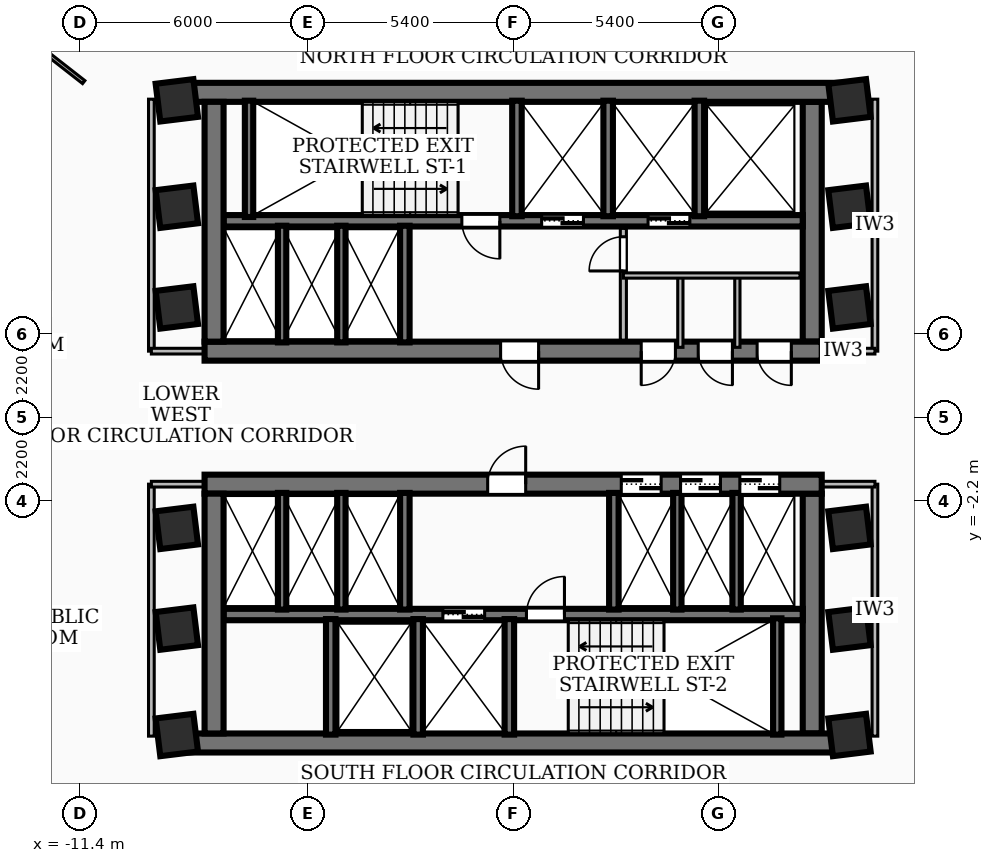
"""IFC4 building model, lengths in metres.
Left out: names, types, materials, properties, quantities, classifications, styles, units other than length and angle.
Written with IfcOpenShell. Run it as: python <this file> out.ifc"""

import sys

from ifc_helpers import new_model, si_unit, direction, frame, frame_2d, origin, origin_2d, place, context, subcontext, project, spatial, rectangle, extrude, element, fill, save


model = new_model("IFC4")
c1 = context("Model", 3, precision=1e-05, world=origin(), true_north=direction((0.0, 1.0)))
c2 = subcontext(c1, "Body", "Model", "MODEL_VIEW")
j1 = project(units=[si_unit("LENGTHUNIT", "METRE"), si_unit("PLANEANGLEUNIT", "RADIAN")], contexts=[c1])
p1 = place(None, origin())
s1 = spatial("IfcSite", under=j1, at=p1, CompositionType="ELEMENT")
p2 = place(p1, origin())
s2 = spatial("IfcBuilding", under=s1, at=p2, CompositionType="ELEMENT")
p3 = place(p2, frame((0.0, 0.0, 78.48)))
s3 = spatial("IfcBuildingStorey", under=s2, at=p3, CompositionType="ELEMENT", Elevation=78.48)
p4 = place(p3, frame((-8.78, 8.56, 0.0), z_axis=(0.0, 0.0, 1.0), x_axis=(1.0, 0.0, 0.0)))
e1 = element("IfcWall", 1, at=p4, inside=s3, PredefinedType="SHEAR", context=c2, shape_type="SweptSolid", body=[
    extrude(rectangle(XDim=17.56, YDim=0.5, at=frame_2d((8.78, 0.0))), origin(), (0.0, 0.0, 1.0), 3.34),
])
p5 = place(p3, frame((8.12, 1.75, 0.0), z_axis=(0.0, 0.0, 1.0), x_axis=(-1.0, 0.0, 0.0)))
e2 = element("IfcWall", 2, at=p5, inside=s3, PredefinedType="SHEAR", context=c2, shape_type="SweptSolid", body=[
    extrude(rectangle(XDim=16.24, YDim=0.5, at=frame_2d((8.12, 0.0))), origin(), (0.0, 0.0, 1.0), 3.34),
])
p6 = place(p5, frame((7.45, 0.0, 0.0)))
e3 = element("IfcOpeningElement", 3, at=p6, cuts=e2, PredefinedType="OPENING", context=c2, shape_type="SweptSolid", body=[
    extrude(rectangle(XDim=1.0, YDim=2.1, at=frame_2d((0.5, 1.05))), frame((0.0, 0.26, 0.0), z_axis=(0.0, -1.0, 0.0), x_axis=(1.0, 0.0, 0.0)), (0.0, 0.0, 1.0), 0.52),
])
p7 = place(p5, frame((3.85, 0.0, 0.0)))
e4 = element("IfcOpeningElement", 4, at=p7, cuts=e2, PredefinedType="OPENING", context=c2, shape_type="SweptSolid", body=[
    extrude(rectangle(XDim=0.9, YDim=2.06, at=frame_2d((0.45, 1.03))), frame((0.0, 0.26, 0.0), z_axis=(0.0, -1.0, 0.0), x_axis=(1.0, 0.0, 0.0)), (0.0, 0.0, 1.0), 0.52),
])
p8 = place(p5, frame((2.35, 0.0, 0.0)))
e5 = element("IfcOpeningElement", 5, at=p8, cuts=e2, PredefinedType="OPENING", context=c2, shape_type="SweptSolid", body=[
    extrude(rectangle(XDim=0.9, YDim=2.06, at=frame_2d((0.45, 1.03))), frame((0.0, 0.26, 0.0), z_axis=(0.0, -1.0, 0.0), x_axis=(1.0, 0.0, 0.0)), (0.0, 0.0, 1.0), 0.52),
])
p9 = place(p5, frame((0.8, 0.0, 0.0)))
e6 = element("IfcOpeningElement", 6, at=p9, cuts=e2, PredefinedType="OPENING", context=c2, shape_type="SweptSolid", body=[
    extrude(rectangle(XDim=0.9, YDim=2.06, at=frame_2d((0.45, 1.03))), frame((0.0, 0.26, 0.0), z_axis=(0.0, -1.0, 0.0), x_axis=(1.0, 0.0, 0.0)), (0.0, 0.0, 1.0), 0.52),
])
for number, where, z_axis, x_axis in (
    (7, (-7.87, 2.0, 0.0), (0.0, 0.0, 1.0), (0.0, 1.0, 0.0)),
    (8, (7.87, 8.31, 0.0), (0.0, 0.0, 1.0), (0.0, -1.0, 0.0)),
):
    element("IfcWall", number, at=place(p3, frame(where, z_axis=z_axis, x_axis=x_axis)), inside=s3, PredefinedType="SHEAR", context=c2, shape_type="SweptSolid", body=[
        extrude(rectangle(XDim=6.31, YDim=0.5, at=frame_2d((3.155, 0.0))), origin(), (0.0, 0.0, 1.0), 3.34),
    ])
p10 = place(p3, frame((7.62, 5.18, 0.0), z_axis=(0.0, 0.0, 1.0), x_axis=(-1.0, 0.0, 0.0)))
e9 = element("IfcWall", 9, at=p10, inside=s3, PredefinedType="SOLIDWALL", context=c2, shape_type="SweptSolid", body=[
    extrude(rectangle(XDim=15.24, YDim=0.3, at=frame_2d((7.62, 0.0))), origin(), (0.0, 0.0, 1.0), 3.34),
])
p11 = place(p10, frame((5.77, 0.0, 0.0)))
e10 = element("IfcOpeningElement", 10, at=p11, cuts=e9, PredefinedType="OPENING", context=c2, shape_type="SweptSolid", body=[
    extrude(rectangle(XDim=1.1, YDim=2.15, at=frame_2d((0.55, 1.075))), frame((0.0, 0.16, 0.0), z_axis=(0.0, -1.0, 0.0), x_axis=(1.0, 0.0, 0.0)), (0.0, 0.0, 1.0), 0.32),
])
p12 = place(p10, frame((2.97, 0.0, 0.0)))
e11 = element("IfcOpeningElement", 11, at=p12, cuts=e9, PredefinedType="OPENING", context=c2, shape_type="SweptSolid", body=[
    extrude(rectangle(XDim=1.1, YDim=2.15, at=frame_2d((0.55, 1.075))), frame((0.0, 0.16, 0.0), z_axis=(0.0, -1.0, 0.0), x_axis=(1.0, 0.0, 0.0)), (0.0, 0.0, 1.0), 0.32),
])
p13 = place(p10, frame((7.97, 0.0, 0.0)))
e12 = element("IfcOpeningElement", 12, at=p13, cuts=e9, PredefinedType="OPENING", context=c2, shape_type="SweptSolid", body=[
    extrude(rectangle(XDim=1.0, YDim=2.1, at=frame_2d((0.5, 1.05))), frame((0.0, 0.16, 0.0), z_axis=(0.0, -1.0, 0.0), x_axis=(1.0, 0.0, 0.0)), (0.0, 0.0, 1.0), 0.32),
])
p14 = place(p3, frame((8.78, -8.56, 0.0), z_axis=(0.0, 0.0, 1.0), x_axis=(-1.0, 0.0, 0.0)))
e13 = element("IfcWall", 13, at=p14, inside=s3, PredefinedType="SHEAR", context=c2, shape_type="SweptSolid", body=[
    extrude(rectangle(XDim=17.56, YDim=0.5, at=frame_2d((8.78, 0.0))), origin(), (0.0, 0.0, 1.0), 3.34),
])
p15 = place(p3, frame((-8.12, -1.75, 0.0), z_axis=(0.0, 0.0, 1.0), x_axis=(1.0, 0.0, 0.0)))
e14 = element("IfcWall", 14, at=p15, inside=s3, PredefinedType="SHEAR", context=c2, shape_type="SweptSolid", body=[
    extrude(rectangle(XDim=16.24, YDim=0.5, at=frame_2d((8.12, 0.0))), origin(), (0.0, 0.0, 1.0), 3.34),
])
p16 = place(p15, frame((7.45, 0.0, 0.0)))
e15 = element("IfcOpeningElement", 15, at=p16, cuts=e14, PredefinedType="OPENING", context=c2, shape_type="SweptSolid", body=[
    extrude(rectangle(XDim=1.0, YDim=2.1, at=frame_2d((0.5, 1.05))), frame((0.0, 0.26, 0.0), z_axis=(0.0, -1.0, 0.0), x_axis=(1.0, 0.0, 0.0)), (0.0, 0.0, 1.0), 0.52),
])
p17 = place(p15, frame((10.965, 0.0, 0.0)))
e16 = element("IfcOpeningElement", 16, at=p17, cuts=e14, PredefinedType="OPENING", context=c2, shape_type="SweptSolid", body=[
    extrude(rectangle(XDim=1.05, YDim=2.15, at=frame_2d((0.525, 1.075))), frame((0.0, 0.26, 0.0), z_axis=(0.0, -1.0, 0.0), x_axis=(1.0, 0.0, 0.0)), (0.0, 0.0, 1.0), 0.52),
])
p18 = place(p15, frame((12.525, 0.0, 0.0)))
e17 = element("IfcOpeningElement", 17, at=p18, cuts=e14, PredefinedType="OPENING", context=c2, shape_type="SweptSolid", body=[
    extrude(rectangle(XDim=1.05, YDim=2.15, at=frame_2d((0.525, 1.075))), frame((0.0, 0.26, 0.0), z_axis=(0.0, -1.0, 0.0), x_axis=(1.0, 0.0, 0.0)), (0.0, 0.0, 1.0), 0.52),
])
p19 = place(p15, frame((14.085, 0.0, 0.0)))
e18 = element("IfcOpeningElement", 18, at=p19, cuts=e14, PredefinedType="OPENING", context=c2, shape_type="SweptSolid", body=[
    extrude(rectangle(XDim=1.05, YDim=2.15, at=frame_2d((0.525, 1.075))), frame((0.0, 0.26, 0.0), z_axis=(0.0, -1.0, 0.0), x_axis=(1.0, 0.0, 0.0)), (0.0, 0.0, 1.0), 0.52),
])
for number, where, z_axis, x_axis in (
    (19, (-7.87, -8.31, 0.0), (0.0, 0.0, 1.0), (0.0, 1.0, 0.0)),
    (20, (7.87, -2.0, 0.0), (0.0, 0.0, 1.0), (0.0, -1.0, 0.0)),
):
    element("IfcWall", number, at=place(p3, frame(where, z_axis=z_axis, x_axis=x_axis)), inside=s3, PredefinedType="SHEAR", context=c2, shape_type="SweptSolid", body=[
        extrude(rectangle(XDim=6.31, YDim=0.5, at=frame_2d((3.155, 0.0))), origin(), (0.0, 0.0, 1.0), 3.34),
    ])
p20 = place(p3, frame((-7.62, -5.18, 0.0), z_axis=(0.0, 0.0, 1.0), x_axis=(1.0, 0.0, 0.0)))
e21 = element("IfcWall", 21, at=p20, inside=s3, PredefinedType="SOLIDWALL", context=c2, shape_type="SweptSolid", body=[
    extrude(rectangle(XDim=15.24, YDim=0.3, at=frame_2d((7.62, 0.0))), origin(), (0.0, 0.0, 1.0), 3.34),
])
p21 = place(p20, frame((5.77, 0.0, 0.0)))
e22 = element("IfcOpeningElement", 22, at=p21, cuts=e21, PredefinedType="OPENING", context=c2, shape_type="SweptSolid", body=[
    extrude(rectangle(XDim=1.1, YDim=2.15, at=frame_2d((0.55, 1.075))), frame((0.0, 0.16, 0.0), z_axis=(0.0, -1.0, 0.0), x_axis=(1.0, 0.0, 0.0)), (0.0, 0.0, 1.0), 0.32),
])
p22 = place(p20, frame((7.97, 0.0, 0.0)))
e23 = element("IfcOpeningElement", 23, at=p22, cuts=e21, PredefinedType="OPENING", context=c2, shape_type="SweptSolid", body=[
    extrude(rectangle(XDim=1.0, YDim=2.1, at=frame_2d((0.5, 1.05))), frame((0.0, 0.16, 0.0), z_axis=(0.0, -1.0, 0.0), x_axis=(1.0, 0.0, 0.0)), (0.0, 0.0, 1.0), 0.32),
])
for number, where, z_axis, x_axis in (
    (24, (-6.95, 5.28, 0.0), (0.0, 0.0, 1.0), (0.0, 1.0, 0.0)),
    (25, (6.95, -8.34, 0.0), (0.0, 0.0, 1.0), (0.0, 1.0, 0.0)),
):
    element("IfcWall", number, at=place(p3, frame(where, z_axis=z_axis, x_axis=x_axis)), inside=s3, PredefinedType="SOLIDWALL", context=c2, shape_type="SweptSolid", body=[
        extrude(rectangle(XDim=3.06, YDim=0.22, at=frame_2d((1.53, 0.0))), origin(), (0.0, 0.0, 1.0), 3.34),
    ])
for number, where, z_axis, x_axis in (
    (26, (0.1, 5.3, 0.0), (0.0, 0.0, 1.0), (0.0, 1.0, 0.0)),
    (27, (2.5, 5.3, 0.0), (0.0, 0.0, 1.0), (0.0, 1.0, 0.0)),
    (28, (4.9, 5.3, 0.0), (0.0, 0.0, 1.0), (0.0, 1.0, 0.0)),
):
    element("IfcWall", number, at=place(p3, frame(where, z_axis=z_axis, x_axis=x_axis)), inside=s3, PredefinedType="SOLIDWALL", context=c2, shape_type="SweptSolid", body=[
        extrude(rectangle(XDim=3.04, YDim=0.25, at=frame_2d((1.52, 0.0))), origin(), (0.0, 0.0, 1.0), 3.34),
    ])
p23 = place(p3, frame((-2.85, 1.98, 0.0), z_axis=(0.0, 0.0, 1.0), x_axis=(0.0, 1.0, 0.0)))
e29 = element("IfcWall", 29, at=p23, inside=s3, PredefinedType="SOLIDWALL", context=c2, shape_type="SweptSolid", body=[
    extrude(rectangle(XDim=3.07, YDim=0.25, at=frame_2d((1.535, 0.0))), origin(), (0.0, 0.0, 1.0), 3.34),
])
for number, where, z_axis, x_axis in (
    (30, (-0.1, -8.34, 0.0), (0.0, 0.0, 1.0), (0.0, 1.0, 0.0)),
    (31, (-2.5, -8.34, 0.0), (0.0, 0.0, 1.0), (0.0, 1.0, 0.0)),
    (32, (-4.8, -8.34, 0.0), (0.0, 0.0, 1.0), (0.0, 1.0, 0.0)),
):
    element("IfcWall", number, at=place(p3, frame(where, z_axis=z_axis, x_axis=x_axis)), inside=s3, PredefinedType="SOLIDWALL", context=c2, shape_type="SweptSolid", body=[
        extrude(rectangle(XDim=3.04, YDim=0.25, at=frame_2d((1.52, 0.0))), origin(), (0.0, 0.0, 1.0), 3.34),
    ])
for number, where, z_axis, x_axis in (
    (33, (-2.85, -5.05, 0.0), (0.0, 0.0, 1.0), (0.0, 1.0, 0.0)),
    (34, (2.65, -5.05, 0.0), (0.0, 0.0, 1.0), (0.0, 1.0, 0.0)),
):
    element("IfcWall", number, at=place(p3, frame(where, z_axis=z_axis, x_axis=x_axis)), inside=s3, PredefinedType="SOLIDWALL", context=c2, shape_type="SweptSolid", body=[
        extrude(rectangle(XDim=3.07, YDim=0.25, at=frame_2d((1.535, 0.0))), origin(), (0.0, 0.0, 1.0), 3.34),
    ])
for number, where, z_axis, x_axis in (
    (35, (-6.08, 1.98, 0.0), (0.0, 0.0, 1.0), (0.0, 1.0, 0.0)),
    (36, (-4.52, 1.98, 0.0), (0.0, 0.0, 1.0), (0.0, 1.0, 0.0)),
    (37, (4.32, -5.05, 0.0), (0.0, 0.0, 1.0), (0.0, 1.0, 0.0)),
    (38, (5.88, -5.05, 0.0), (0.0, 0.0, 1.0), (0.0, 1.0, 0.0)),
    (39, (-6.08, -5.05, 0.0), (0.0, 0.0, 1.0), (0.0, 1.0, 0.0)),
    (40, (-4.52, -5.05, 0.0), (0.0, 0.0, 1.0), (0.0, 1.0, 0.0)),
):
    element("IfcWall", number, at=place(p3, frame(where, z_axis=z_axis, x_axis=x_axis)), inside=s3, PredefinedType="SOLIDWALL", context=c2, shape_type="SweptSolid", body=[
        extrude(rectangle(XDim=3.07, YDim=0.22, at=frame_2d((1.535, 0.0))), origin(), (0.0, 0.0, 1.0), 3.34),
    ])
for number, where, z_axis, x_axis in (
    (41, (-8.85, -5.55, 0.0), (0.0, 0.0, 1.0), (0.993, 0.122, 0.0)),
    (42, (-8.85, -2.9, 0.0), (0.0, 0.0, 1.0), (0.993, 0.122, 0.0)),
    (43, (-8.85, 2.9, 0.0), (0.0, 0.0, 1.0), (0.993, 0.122, 0.0)),
    (44, (-8.85, 5.55, 0.0), (0.0, 0.0, 1.0), (0.993, 0.122, 0.0)),
    (45, (8.85, -5.55, 0.0), (0.0, 0.0, 1.0), (0.993, 0.122, 0.0)),
    (46, (8.85, -2.9, 0.0), (0.0, 0.0, 1.0), (0.993, 0.122, 0.0)),
    (47, (8.85, 2.9, 0.0), (0.0, 0.0, 1.0), (0.993, 0.122, 0.0)),
    (48, (8.85, 5.55, 0.0), (0.0, 0.0, 1.0), (0.993, 0.122, 0.0)),
    (49, (-8.85, 8.35, 0.0), (0.0, 0.0, 1.0), (0.993, 0.122, 0.0)),
    (50, (8.85, -8.35, 0.0), (0.0, 0.0, 1.0), (0.993, 0.122, 0.0)),
    (51, (8.85, 8.35, 0.0), (0.0, 0.0, 1.0), (0.993, 0.122, 0.0)),
    (52, (-8.85, -8.35, 0.0), (0.0, 0.0, 1.0), (0.993, 0.122, 0.0)),
):
    element("IfcColumn", number, at=place(p3, frame(where, z_axis=z_axis, x_axis=x_axis)), inside=s3, PredefinedType="COLUMN", context=c2, shape_type="SweptSolid", body=[
        extrude(rectangle(XDim=1.0, YDim=1.0, at=origin_2d()), origin(), (0.0, 0.0, 1.0), 3.6),
    ])
p24 = place(p3, frame((2.9, 2.04, 0.0), z_axis=(0.0, 0.0, 1.0), x_axis=(0.0, 1.0, 0.0)))
e53 = element("IfcWall", 53, at=p24, inside=s3, PredefinedType="PARTITIONING", context=c2, shape_type="SweptSolid", body=[
    extrude(rectangle(XDim=2.94, YDim=0.16, at=frame_2d((1.47, 0.0))), origin(), (0.0, 0.0, 1.0), 2.405),
])
p25 = place(p24, frame((1.82, 0.0, 0.0)))
e54 = element("IfcOpeningElement", 54, at=p25, cuts=e53, PredefinedType="OPENING", context=c2, shape_type="SweptSolid", body=[
    extrude(rectangle(XDim=0.9, YDim=2.06, at=frame_2d((0.45, 1.03))), frame((0.0, 0.09, 0.0), z_axis=(0.0, -1.0, 0.0), x_axis=(1.0, 0.0, 0.0)), (0.0, 0.0, 1.0), 0.18),
])
p26 = place(p3, frame((2.9, 3.74, 0.0), z_axis=(0.0, 0.0, 1.0), x_axis=(1.0, 0.0, 0.0)))
e55 = element("IfcWall", 55, at=p26, inside=s3, PredefinedType="PARTITIONING", context=c2, shape_type="SweptSolid", body=[
    extrude(rectangle(XDim=4.65, YDim=0.138, at=frame_2d((2.325, 0.0))), origin(), (0.0, 0.0, 1.0), 3.34),
])
for number, where, z_axis, x_axis in (
    (56, (4.4, 1.85, 0.0), (0.0, 0.0, 1.0), (0.0, 1.0, 0.0)),
    (57, (5.9, 1.85, 0.0), (0.0, 0.0, 1.0), (0.0, 1.0, 0.0)),
):
    element("IfcWall", number, at=place(p3, frame(where, z_axis=z_axis, x_axis=x_axis)), inside=s3, PredefinedType="PARTITIONING", context=c2, shape_type="SweptSolid", body=[
        extrude(rectangle(XDim=1.89, YDim=0.138, at=frame_2d((0.945, 0.0))), origin(), (0.0, 0.0, 1.0), 2.405),
    ])
p27 = place(p3, frame((-9.52, 1.75, 0.0), z_axis=(0.0, 0.0, 1.0), x_axis=(0.0, 1.0, 0.0)))
e58 = element("IfcWall", 58, at=p27, inside=s3, PredefinedType="PARTITIONING", context=c2, shape_type="SweptSolid", body=[
    extrude(rectangle(XDim=6.63, YDim=0.15, at=frame_2d((3.315, 0.0))), origin(), (0.0, 0.0, 1.0), 2.486),
])
p28 = place(p3, frame((-7.85, 1.75, 0.0), z_axis=(0.0, 0.0, 1.0), x_axis=(-1.0, 0.0, 0.0)))
e59 = element("IfcWall", 59, at=p28, inside=s3, PredefinedType="PARTITIONING", context=c2, shape_type="SweptSolid", body=[
    extrude(rectangle(XDim=1.67, YDim=0.15, at=frame_2d((0.835, 0.0))), origin(), (0.0, 0.0, 1.0), 2.405),
])
p29 = place(p3, frame((-9.52, -8.38, 0.0), z_axis=(0.0, 0.0, 1.0), x_axis=(0.0, 1.0, 0.0)))
e60 = element("IfcWall", 60, at=p29, inside=s3, PredefinedType="PARTITIONING", context=c2, shape_type="SweptSolid", body=[
    extrude(rectangle(XDim=6.63, YDim=0.15, at=frame_2d((3.315, 0.0))), origin(), (0.0, 0.0, 1.0), 2.486),
])
p30 = place(p3, frame((-7.85, -1.75, 0.0), z_axis=(0.0, 0.0, 1.0), x_axis=(-1.0, 0.0, 0.0)))
e61 = element("IfcWall", 61, at=p30, inside=s3, PredefinedType="PARTITIONING", context=c2, shape_type="SweptSolid", body=[
    extrude(rectangle(XDim=1.67, YDim=0.15, at=frame_2d((0.835, 0.0))), origin(), (0.0, 0.0, 1.0), 2.405),
])
p31 = place(p3, frame((9.52, 1.75, 0.0), z_axis=(0.0, 0.0, 1.0), x_axis=(0.0, 1.0, 0.0)))
e62 = element("IfcWall", 62, at=p31, inside=s3, PredefinedType="PARTITIONING", context=c2, shape_type="SweptSolid", body=[
    extrude(rectangle(XDim=6.63, YDim=0.15, at=frame_2d((3.315, 0.0))), origin(), (0.0, 0.0, 1.0), 2.486),
])
p32 = place(p3, frame((7.85, 1.75, 0.0), z_axis=(0.0, 0.0, 1.0), x_axis=(1.0, 0.0, 0.0)))
e63 = element("IfcWall", 63, at=p32, inside=s3, PredefinedType="PARTITIONING", context=c2, shape_type="SweptSolid", body=[
    extrude(rectangle(XDim=1.67, YDim=0.15, at=frame_2d((0.835, 0.0))), origin(), (0.0, 0.0, 1.0), 2.405),
])
p33 = place(p3, frame((9.52, -8.38, 0.0), z_axis=(0.0, 0.0, 1.0), x_axis=(0.0, 1.0, 0.0)))
e64 = element("IfcWall", 64, at=p33, inside=s3, PredefinedType="PARTITIONING", context=c2, shape_type="SweptSolid", body=[
    extrude(rectangle(XDim=6.63, YDim=0.15, at=frame_2d((3.315, 0.0))), origin(), (0.0, 0.0, 1.0), 2.486),
])
p34 = place(p3, frame((7.85, -1.75, 0.0), z_axis=(0.0, 0.0, 1.0), x_axis=(1.0, 0.0, 0.0)))
e65 = element("IfcWall", 65, at=p34, inside=s3, PredefinedType="PARTITIONING", context=c2, shape_type="SweptSolid", body=[
    extrude(rectangle(XDim=1.67, YDim=0.15, at=frame_2d((0.835, 0.0))), origin(), (0.0, 0.0, 1.0), 2.405),
])
p35 = place(p3, frame((-11.3, 8.829, 0.0), z_axis=(0.0, 0.0, 1.0), x_axis=(-0.788014623364, 0.61565652223, 0.0)))
e66 = element("IfcWall", 66, at=p35, inside=s3, PredefinedType="PARTITIONING", context=c2, shape_type="SweptSolid", body=[
    extrude(rectangle(XDim=5.315, YDim=0.1, at=frame_2d((2.657, 0.0))), origin(), (0.0, 0.0, 1.0), 3.34),
])
p36 = place(p6, origin())
e67 = element("IfcDoor", 67, at=p36, inside=s3, OperationType="SINGLE_SWING_LEFT", PredefinedType="DOOR", context=c2, shape_type="SweptSolid", body=[
    extrude(rectangle(XDim=1.0, YDim=2.1, at=frame_2d((0.5, 1.05))), frame((0.0, 0.025, 0.0), z_axis=(0.0, -1.0, 0.0), x_axis=(1.0, 0.0, 0.0)), (0.0, 0.0, 1.0), 0.05),
])
fill(e3, e67)
p37 = place(p16, origin())
e68 = element("IfcDoor", 68, at=p37, inside=s3, OperationType="SINGLE_SWING_RIGHT", PredefinedType="DOOR", context=c2, shape_type="SweptSolid", body=[
    extrude(rectangle(XDim=1.0, YDim=2.1, at=frame_2d((0.5, 1.05))), frame((0.0, 0.025, 0.0), z_axis=(0.0, -1.0, 0.0), x_axis=(1.0, 0.0, 0.0)), (0.0, 0.0, 1.0), 0.05),
])
fill(e15, e68)
p38 = place(p11, origin())
e69 = element("IfcDoor", 69, at=p38, inside=s3, OperationType="DOUBLE_DOOR_SLIDING", PredefinedType="DOOR", context=c2, shape_type="SweptSolid", body=[
    extrude(rectangle(XDim=1.1, YDim=2.15, at=frame_2d((0.55, 1.075))), frame((0.0, 0.025, 0.0), z_axis=(0.0, -1.0, 0.0), x_axis=(1.0, 0.0, 0.0)), (0.0, 0.0, 1.0), 0.05),
])
fill(e10, e69)
p39 = place(p12, origin())
e70 = element("IfcDoor", 70, at=p39, inside=s3, OperationType="DOUBLE_DOOR_SLIDING", PredefinedType="DOOR", context=c2, shape_type="SweptSolid", body=[
    extrude(rectangle(XDim=1.1, YDim=2.15, at=frame_2d((0.55, 1.075))), frame((0.0, 0.025, 0.0), z_axis=(0.0, -1.0, 0.0), x_axis=(1.0, 0.0, 0.0)), (0.0, 0.0, 1.0), 0.05),
])
fill(e11, e70)
p40 = place(p13, origin())
e71 = element("IfcDoor", 71, at=p40, inside=s3, OperationType="SINGLE_SWING_LEFT", PredefinedType="DOOR", context=c2, shape_type="SweptSolid", body=[
    extrude(rectangle(XDim=1.0, YDim=2.1, at=frame_2d((0.5, 1.05))), frame((0.0, 0.025, 0.0), z_axis=(0.0, -1.0, 0.0), x_axis=(1.0, 0.0, 0.0)), (0.0, 0.0, 1.0), 0.05),
])
fill(e12, e71)
p41 = place(p21, origin())
e72 = element("IfcDoor", 72, at=p41, inside=s3, OperationType="DOUBLE_DOOR_SLIDING", PredefinedType="DOOR", context=c2, shape_type="SweptSolid", body=[
    extrude(rectangle(XDim=1.1, YDim=2.15, at=frame_2d((0.55, 1.075))), frame((0.0, 0.025, 0.0), z_axis=(0.0, -1.0, 0.0), x_axis=(1.0, 0.0, 0.0)), (0.0, 0.0, 1.0), 0.05),
])
fill(e22, e72)
p42 = place(p22, origin())
e73 = element("IfcDoor", 73, at=p42, inside=s3, OperationType="SINGLE_SWING_RIGHT", PredefinedType="DOOR", context=c2, shape_type="SweptSolid", body=[
    extrude(rectangle(XDim=1.0, YDim=2.1, at=frame_2d((0.5, 1.05))), frame((0.0, 0.025, 0.0), z_axis=(0.0, -1.0, 0.0), x_axis=(1.0, 0.0, 0.0)), (0.0, 0.0, 1.0), 0.05),
])
fill(e23, e73)
p43 = place(p17, origin())
e74 = element("IfcDoor", 74, at=p43, inside=s3, OperationType="DOUBLE_DOOR_SLIDING", PredefinedType="DOOR", context=c2, shape_type="SweptSolid", body=[
    extrude(rectangle(XDim=1.05, YDim=2.15, at=frame_2d((0.525, 1.075))), frame((0.0, 0.025, 0.0), z_axis=(0.0, -1.0, 0.0), x_axis=(1.0, 0.0, 0.0)), (0.0, 0.0, 1.0), 0.05),
])
fill(e16, e74)
p44 = place(p18, origin())
e75 = element("IfcDoor", 75, at=p44, inside=s3, OperationType="DOUBLE_DOOR_SLIDING", PredefinedType="DOOR", context=c2, shape_type="SweptSolid", body=[
    extrude(rectangle(XDim=1.05, YDim=2.15, at=frame_2d((0.525, 1.075))), frame((0.0, 0.025, 0.0), z_axis=(0.0, -1.0, 0.0), x_axis=(1.0, 0.0, 0.0)), (0.0, 0.0, 1.0), 0.05),
])
fill(e17, e75)
p45 = place(p19, origin())
e76 = element("IfcDoor", 76, at=p45, inside=s3, OperationType="DOUBLE_DOOR_SLIDING", PredefinedType="DOOR", context=c2, shape_type="SweptSolid", body=[
    extrude(rectangle(XDim=1.05, YDim=2.15, at=frame_2d((0.525, 1.075))), frame((0.0, 0.025, 0.0), z_axis=(0.0, -1.0, 0.0), x_axis=(1.0, 0.0, 0.0)), (0.0, 0.0, 1.0), 0.05),
])
fill(e18, e76)
p46 = place(p7, origin())
e77 = element("IfcDoor", 77, at=p46, inside=s3, OperationType="SINGLE_SWING_RIGHT", PredefinedType="DOOR", context=c2, shape_type="SweptSolid", body=[
    extrude(rectangle(XDim=0.9, YDim=2.06, at=frame_2d((0.45, 1.03))), frame((0.0, 0.025, 0.0), z_axis=(0.0, -1.0, 0.0), x_axis=(1.0, 0.0, 0.0)), (0.0, 0.0, 1.0), 0.05),
])
fill(e4, e77)
p47 = place(p8, origin())
e78 = element("IfcDoor", 78, at=p47, inside=s3, OperationType="SINGLE_SWING_LEFT", PredefinedType="DOOR", context=c2, shape_type="SweptSolid", body=[
    extrude(rectangle(XDim=0.9, YDim=2.06, at=frame_2d((0.45, 1.03))), frame((0.0, 0.025, 0.0), z_axis=(0.0, -1.0, 0.0), x_axis=(1.0, 0.0, 0.0)), (0.0, 0.0, 1.0), 0.05),
])
fill(e5, e78)
p48 = place(p9, origin())
e79 = element("IfcDoor", 79, at=p48, inside=s3, OperationType="SINGLE_SWING_LEFT", PredefinedType="DOOR", context=c2, shape_type="SweptSolid", body=[
    extrude(rectangle(XDim=0.9, YDim=2.06, at=frame_2d((0.45, 1.03))), frame((0.0, 0.025, 0.0), z_axis=(0.0, -1.0, 0.0), x_axis=(1.0, 0.0, 0.0)), (0.0, 0.0, 1.0), 0.05),
])
fill(e6, e79)
p49 = place(p25, origin())
e80 = element("IfcDoor", 80, at=p49, inside=s3, OperationType="SINGLE_SWING_LEFT", PredefinedType="DOOR", context=c2, shape_type="SweptSolid", body=[
    extrude(rectangle(XDim=0.9, YDim=2.06, at=frame_2d((0.45, 1.03))), frame((0.0, 0.025, 0.0), z_axis=(0.0, -1.0, 0.0), x_axis=(1.0, 0.0, 0.0)), (0.0, 0.0, 1.0), 0.05),
])
fill(e54, e80)
save(model, sys.argv[1])
